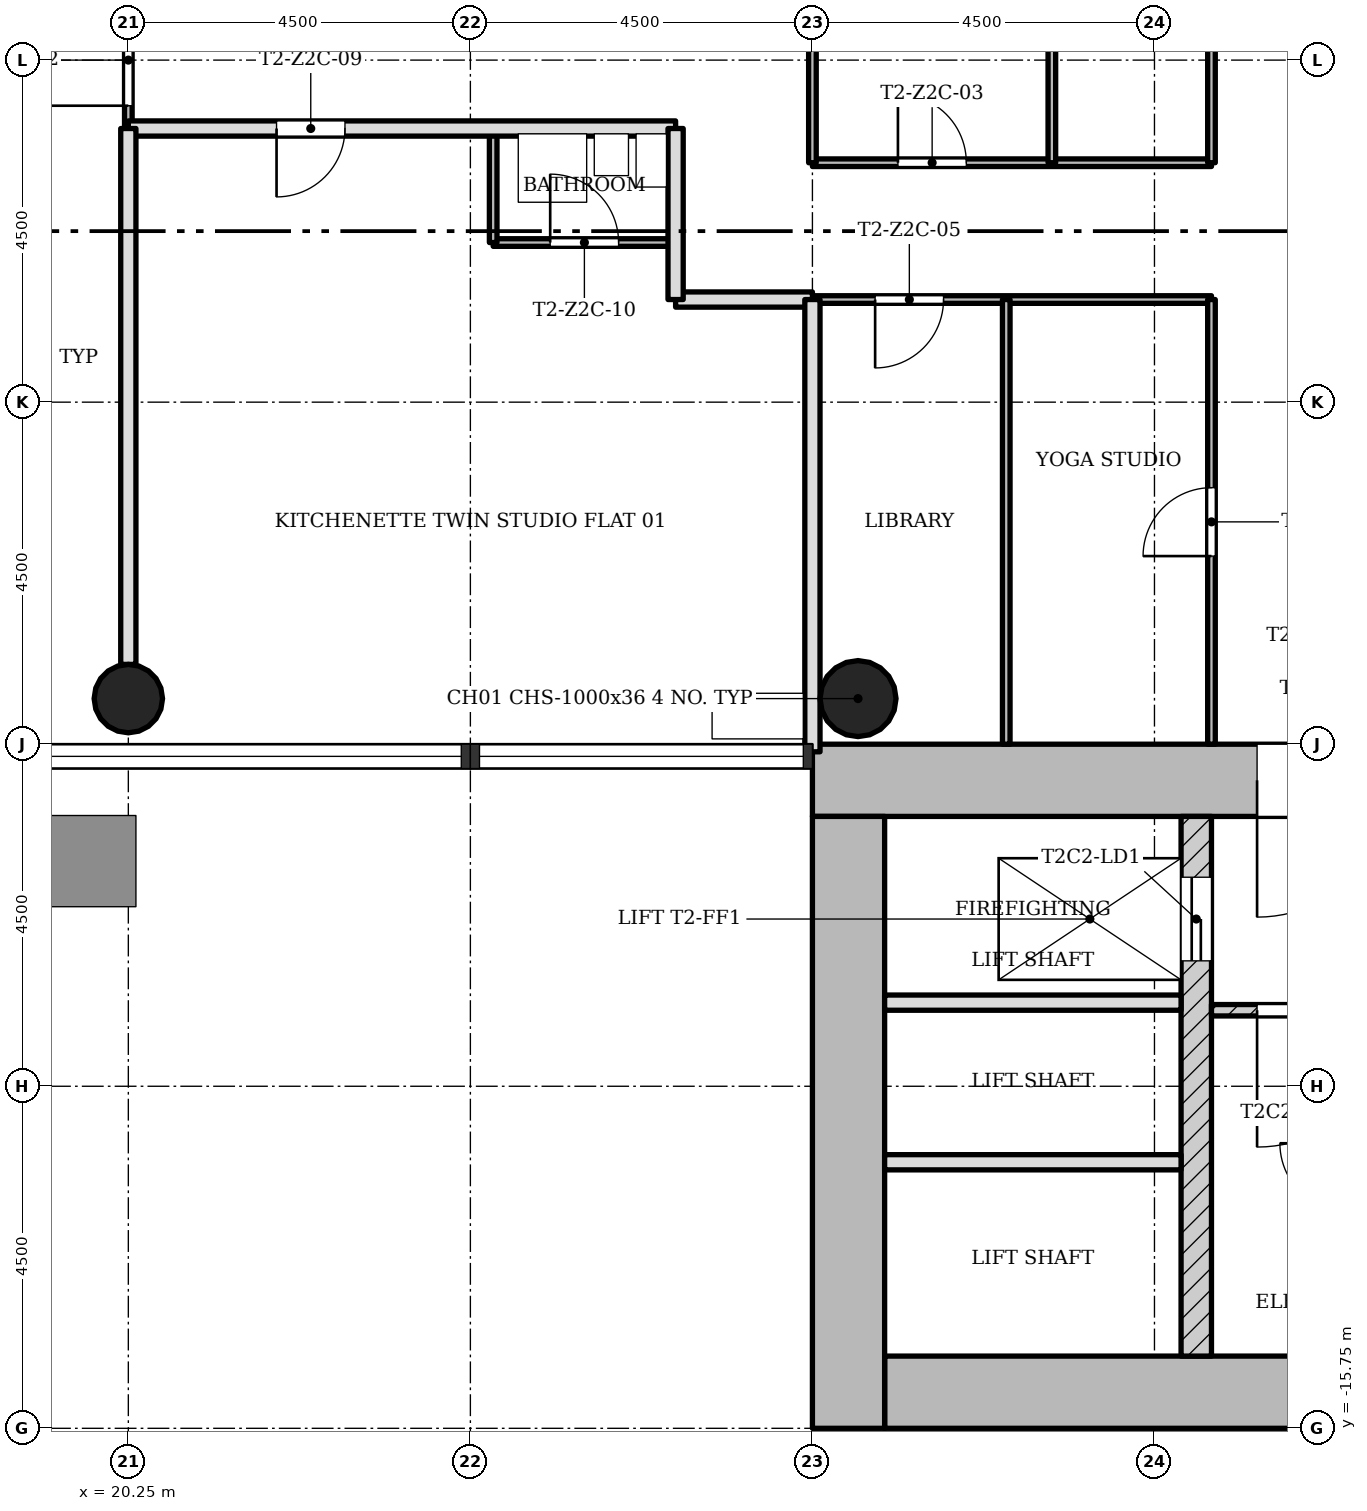
"""IFC4 building model, lengths in metres.
Left out: names, types, materials, properties, quantities, classifications, styles, units other than length and angle.
Written with IfcOpenShell. Run it as: python <this file> out.ifc"""

import sys

from ifc_helpers import new_model, si_unit, direction, frame, frame_2d, origin, origin_2d, place, context, subcontext, project, spatial, rectangle, hollow_circle, extrude, element, fill, save


model = new_model("IFC4")
c1 = context("Model", 3, precision=1e-05, world=origin(), true_north=direction((0.0, 1.0)))
c2 = subcontext(c1, "Body", "Model", "MODEL_VIEW")
j1 = project(units=[si_unit("LENGTHUNIT", "METRE"), si_unit("PLANEANGLEUNIT", "RADIAN")], contexts=[c1])
p1 = place(None, origin())
s1 = spatial("IfcSite", under=j1, at=p1, CompositionType="ELEMENT")
p2 = place(p1, origin())
s2 = spatial("IfcBuilding", under=s1, at=p2, CompositionType="ELEMENT")
p3 = place(p2, frame((0.0, 0.0, 86.8)))
s3 = spatial("IfcBuildingStorey", under=s2, at=p3, CompositionType="ELEMENT", Elevation=86.8)
p4 = place(p3, frame((30.2, -15.275, 0.0), z_axis=(0.0, 0.0, 1.0), x_axis=(1.0, 0.0, 0.0)))
e1 = element("IfcWall", 1, at=p4, inside=s3, PredefinedType="SHEAR", context=c2, shape_type="SweptSolid", body=[
    extrude(rectangle(XDim=12.55, YDim=0.95, at=frame_2d((6.275, 0.0))), origin(), (0.0, 0.0, 1.0), 3.4),
])
p5 = place(p4, frame((5.35, 0.0, 0.45)))
e2 = element("IfcOpeningElement", 2, at=p5, cuts=e1, PredefinedType="OPENING", context=c2, shape_type="SweptSolid", body=[
    extrude(rectangle(XDim=0.9, YDim=2.4, at=frame_2d((0.45, 1.2))), frame((0.0, 0.485, 0.0), z_axis=(0.0, -1.0, 0.0), x_axis=(1.0, 0.0, 0.0)), (0.0, 0.0, 1.0), 0.97),
])
p6 = place(p3, frame((41.8, -7.225, 0.0), z_axis=(0.0, 0.0, 1.0), x_axis=(-1.0, 0.0, 0.0)))
e3 = element("IfcWall", 3, at=p6, inside=s3, PredefinedType="SHEAR", context=c2, shape_type="SweptSolid", body=[
    extrude(rectangle(XDim=12.55, YDim=0.95, at=frame_2d((6.275, 0.0))), origin(), (0.0, 0.0, 1.0), 3.4),
])
p7 = place(p6, frame((4.9, 0.0, 0.0)))
e4 = element("IfcOpeningElement", 4, at=p7, cuts=e3, PredefinedType="OPENING", context=c2, shape_type="SweptSolid", body=[
    extrude(rectangle(XDim=1.8, YDim=2.1, at=frame_2d((0.9, 1.05))), frame((0.0, 0.485, 0.0), z_axis=(0.0, -1.0, 0.0), x_axis=(1.0, 0.0, 0.0)), (0.0, 0.0, 1.0), 0.97),
])
p8 = place(p3, frame((29.725, -7.7, 0.0), z_axis=(0.0, 0.0, 1.0), x_axis=(0.0, -1.0, 0.0)))
e5 = element("IfcWall", 5, at=p8, inside=s3, PredefinedType="SHEAR", context=c2, shape_type="SweptSolid", body=[
    extrude(rectangle(XDim=8.05, YDim=0.95, at=frame_2d((4.025, 0.0))), origin(), (0.0, 0.0, 1.0), 3.4),
])
p9 = place(p3, frame((34.3, -14.8, 0.0), z_axis=(0.0, 0.0, 1.0), x_axis=(0.0, 1.0, 0.0)))
e6 = element("IfcWall", 6, at=p9, inside=s3, PredefinedType="SHEAR", context=c2, shape_type="SweptSolid", body=[
    extrude(rectangle(XDim=7.1, YDim=0.4, at=frame_2d((3.55, 0.0))), origin(), (0.0, 0.0, 1.0), 3.4),
])
p10 = place(p9, frame((5.2, 0.0, 0.0)))
e7 = element("IfcOpeningElement", 7, at=p10, cuts=e6, PredefinedType="OPENING", context=c2, shape_type="SweptSolid", body=[
    extrude(rectangle(XDim=1.1, YDim=2.1, at=frame_2d((0.55, 1.05))), frame((0.0, 0.21, 0.0), z_axis=(0.0, -1.0, 0.0), x_axis=(1.0, 0.0, 0.0)), (0.0, 0.0, 1.0), 0.42),
])
p11 = place(p3, frame((20.25, -6.15, 0.0), z_axis=(0.0, 0.0, 1.0), x_axis=(1.0, 0.0, 0.0)))
e8 = element("IfcColumn", 8, at=p11, inside=s3, PredefinedType="COLUMN", context=c2, shape_type="SweptSolid", body=[
    extrude(hollow_circle(Radius=0.45, WallThickness=0.032, at=origin_2d()), origin(), (0.0, 0.0, 1.0), 3.4),
])
p12 = place(p3, frame((29.85, -6.15, 0.0), z_axis=(0.0, 0.0, 1.0), x_axis=(1.0, 0.0, 0.0)))
e9 = element("IfcColumn", 9, at=p12, inside=s3, PredefinedType="COLUMN", context=c2, shape_type="SweptSolid", body=[
    extrude(hollow_circle(Radius=0.5, WallThickness=0.036, at=origin_2d()), origin(), (0.0, 0.0, 1.0), 3.4),
])
p13 = place(p3, frame((34.5, -10.25, 0.0), z_axis=(0.0, 0.0, 1.0), x_axis=(1.0, 0.0, 0.0)))
e10 = element("IfcWall", 10, at=p13, inside=s3, PredefinedType="PARTITIONING", context=c2, shape_type="SweptSolid", body=[
    extrude(rectangle(XDim=3.0, YDim=0.15, at=frame_2d((1.5, 0.0))), origin(), (0.0, 0.0, 1.0), 3.0),
])
p14 = place(p13, frame((0.6, 0.0, 0.0)))
e11 = element("IfcOpeningElement", 11, at=p14, cuts=e10, PredefinedType="OPENING", context=c2, shape_type="SweptSolid", body=[
    extrude(rectangle(XDim=1.8, YDim=2.1, at=frame_2d((0.9, 1.05))), frame((0.0, 0.085, 0.0), z_axis=(0.0, -1.0, 0.0), x_axis=(1.0, 0.0, 0.0)), (0.0, 0.0, 1.0), 0.17),
])
for number, where, z_axis, x_axis in (
    (12, (30.2, -10.15, 0.0), (0.0, 0.0, 1.0), (1.0, 0.0, 0.0)),
    (13, (30.2, -12.25, 0.0), (0.0, 0.0, 1.0), (1.0, 0.0, 0.0)),
):
    element("IfcWall", number, at=place(p3, frame(where, z_axis=z_axis, x_axis=x_axis)), inside=s3, PredefinedType="SOLIDWALL", context=c2, shape_type="SweptSolid", body=[
        extrude(rectangle(XDim=3.9, YDim=0.2, at=frame_2d((1.95, 0.0))), origin(), (0.0, 0.0, 1.0), 3.0),
    ])
p15 = place(p3, frame((34.5, -0.9, 0.0), z_axis=(0.0, 0.0, 1.0), x_axis=(-1.0, 0.0, 0.0)))
e14 = element("IfcWall", 14, at=p15, inside=s3, PredefinedType="PARTITIONING", context=c2, shape_type="SweptSolid", body=[
    extrude(rectangle(XDim=5.25, YDim=0.1, at=frame_2d((2.625, 0.0))), origin(), (0.0, 0.0, 1.0), 3.0),
])
p16 = place(p15, frame((3.525, 0.0, 0.0)))
e15 = element("IfcOpeningElement", 15, at=p16, cuts=e14, PredefinedType="OPENING", context=c2, shape_type="SweptSolid", body=[
    extrude(rectangle(XDim=0.9, YDim=2.1, at=frame_2d((0.45, 1.05))), frame((0.0, 0.06, 0.0), z_axis=(0.0, -1.0, 0.0), x_axis=(1.0, 0.0, 0.0)), (0.0, 0.0, 1.0), 0.12),
])
p17 = place(p3, frame((29.25, -0.9, 0.0), z_axis=(0.0, 0.0, 1.0), x_axis=(-1.0, 0.0, 0.0)))
e16 = element("IfcWall", 16, at=p17, inside=s3, PredefinedType="SOLIDWALL", context=c2, shape_type="SweptSolid", body=[
    extrude(rectangle(XDim=1.8, YDim=0.2, at=frame_2d((0.9, 0.0))), origin(), (0.0, 0.0, 1.0), 3.0),
])
p18 = place(p3, frame((27.45, -0.15, 0.0), z_axis=(0.0, 0.0, 1.0), x_axis=(-1.0, 0.0, 0.0)))
e17 = element("IfcWall", 17, at=p18, inside=s3, PredefinedType="PARTITIONING", context=c2, shape_type="SweptSolid", body=[
    extrude(rectangle(XDim=2.4, YDim=0.1, at=frame_2d((1.2, 0.0))), origin(), (0.0, 0.0, 1.0), 3.0),
])
p19 = place(p18, frame((0.75, 0.0, 0.0)))
e18 = element("IfcOpeningElement", 18, at=p19, cuts=e17, PredefinedType="OPENING", context=c2, shape_type="SweptSolid", body=[
    extrude(rectangle(XDim=0.9, YDim=2.1, at=frame_2d((0.45, 1.05))), frame((0.0, 0.06, 0.0), z_axis=(0.0, -1.0, 0.0), x_axis=(1.0, 0.0, 0.0)), (0.0, 0.0, 1.0), 0.12),
])
p20 = place(p3, frame((34.5, 0.9, 0.0), z_axis=(0.0, 0.0, 1.0), x_axis=(-1.0, 0.0, 0.0)))
e19 = element("IfcWall", 19, at=p20, inside=s3, PredefinedType="PARTITIONING", context=c2, shape_type="SweptSolid", body=[
    extrude(rectangle(XDim=5.25, YDim=0.1, at=frame_2d((2.625, 0.0))), origin(), (0.0, 0.0, 1.0), 3.0),
])
p21 = place(p20, frame((3.225, 0.0, 0.0)))
e20 = element("IfcOpeningElement", 20, at=p21, cuts=e19, PredefinedType="OPENING", context=c2, shape_type="SweptSolid", body=[
    extrude(rectangle(XDim=0.9, YDim=2.1, at=frame_2d((0.45, 1.05))), frame((0.0, 0.06, 0.0), z_axis=(0.0, -1.0, 0.0), x_axis=(1.0, 0.0, 0.0)), (0.0, 0.0, 1.0), 0.12),
])
p22 = place(p3, frame((27.45, 1.35, 0.0), z_axis=(0.0, 0.0, 1.0), x_axis=(-1.0, 0.0, 0.0)))
e21 = element("IfcWall", 21, at=p22, inside=s3, PredefinedType="SOLIDWALL", context=c2, shape_type="SweptSolid", body=[
    extrude(rectangle(XDim=7.2, YDim=0.2, at=frame_2d((3.6, 0.0))), origin(), (0.0, 0.0, 1.0), 3.0),
])
p23 = place(p22, frame((4.35, 0.0, 0.0)))
e22 = element("IfcOpeningElement", 22, at=p23, cuts=e21, PredefinedType="OPENING", context=c2, shape_type="SweptSolid", body=[
    extrude(rectangle(XDim=0.9, YDim=2.1, at=frame_2d((0.45, 1.05))), frame((0.0, 0.11, 0.0), z_axis=(0.0, -1.0, 0.0), x_axis=(1.0, 0.0, 0.0)), (0.0, 0.0, 1.0), 0.22),
])
p24 = place(p3, frame((34.5, -6.75, 0.0), z_axis=(0.0, 0.0, 1.0), x_axis=(0.0, 1.0, 0.0)))
e23 = element("IfcWall", 23, at=p24, inside=s3, PredefinedType="PARTITIONING", context=c2, shape_type="SweptSolid", body=[
    extrude(rectangle(XDim=5.85, YDim=0.1, at=frame_2d((2.925, 0.0))), origin(), (0.0, 0.0, 1.0), 3.0),
])
p25 = place(p24, frame((2.475, 0.0, 0.0)))
e24 = element("IfcOpeningElement", 24, at=p25, cuts=e23, PredefinedType="OPENING", context=c2, shape_type="SweptSolid", body=[
    extrude(rectangle(XDim=0.9, YDim=2.1, at=frame_2d((0.45, 1.05))), frame((0.0, 0.06, 0.0), z_axis=(0.0, -1.0, 0.0), x_axis=(1.0, 0.0, 0.0)), (0.0, 0.0, 1.0), 0.12),
])
p26 = place(p3, frame((34.5, 0.9, 0.0), z_axis=(0.0, 0.0, 1.0), x_axis=(0.0, 1.0, 0.0)))
e25 = element("IfcWall", 25, at=p26, inside=s3, PredefinedType="PARTITIONING", context=c2, shape_type="SweptSolid", body=[
    extrude(rectangle(XDim=5.85, YDim=0.1, at=frame_2d((2.925, 0.0))), origin(), (0.0, 0.0, 1.0), 3.0),
])
p27 = place(p26, frame((2.475, 0.0, 0.0)))
e26 = element("IfcOpeningElement", 26, at=p27, cuts=e25, PredefinedType="OPENING", context=c2, shape_type="SweptSolid", body=[
    extrude(rectangle(XDim=0.9, YDim=2.1, at=frame_2d((0.45, 1.05))), frame((0.0, 0.06, 0.0), z_axis=(0.0, -1.0, 0.0), x_axis=(1.0, 0.0, 0.0)), (0.0, 0.0, 1.0), 0.12),
])
for number, where, z_axis, x_axis in (
    (27, (32.4, 0.9, 0.0), (0.0, 0.0, 1.0), (0.0, 1.0, 0.0)),
    (28, (31.8, -6.75, 0.0), (0.0, 0.0, 1.0), (0.0, 1.0, 0.0)),
):
    element("IfcWall", number, at=place(p3, frame(where, z_axis=z_axis, x_axis=x_axis)), inside=s3, PredefinedType="PARTITIONING", context=c2, shape_type="SweptSolid", body=[
        extrude(rectangle(XDim=5.85, YDim=0.1, at=frame_2d((2.925, 0.0))), origin(), (0.0, 0.0, 1.0), 3.0),
    ])
p28 = place(p3, frame((29.25, 0.9, 0.0), z_axis=(0.0, 0.0, 1.0), x_axis=(0.0, 1.0, 0.0)))
e29 = element("IfcWall", 29, at=p28, inside=s3, PredefinedType="PARTITIONING", context=c2, shape_type="SweptSolid", body=[
    extrude(rectangle(XDim=5.95, YDim=0.1, at=frame_2d((2.975, 0.0))), origin(), (0.0, 0.0, 1.0), 3.0),
])
p29 = place(p3, frame((29.25, -6.85, 0.0), z_axis=(0.0, 0.0, 1.0), x_axis=(0.0, 1.0, 0.0)))
e30 = element("IfcWall", 30, at=p29, inside=s3, PredefinedType="SOLIDWALL", context=c2, shape_type="SweptSolid", body=[
    extrude(rectangle(XDim=5.95, YDim=0.2, at=frame_2d((2.975, 0.0))), origin(), (0.0, 0.0, 1.0), 3.0),
])
p30 = place(p3, frame((27.45, -0.9, 0.0), z_axis=(0.0, 0.0, 1.0), x_axis=(0.0, 1.0, 0.0)))
e31 = element("IfcWall", 31, at=p30, inside=s3, PredefinedType="SOLIDWALL", context=c2, shape_type="SweptSolid", body=[
    extrude(rectangle(XDim=2.25, YDim=0.2, at=frame_2d((1.125, 0.0))), origin(), (0.0, 0.0, 1.0), 3.0),
])
p31 = place(p3, frame((25.05, -0.15, 0.0), z_axis=(0.0, 0.0, 1.0), x_axis=(0.0, 1.0, 0.0)))
e32 = element("IfcWall", 32, at=p31, inside=s3, PredefinedType="PARTITIONING", context=c2, shape_type="SweptSolid", body=[
    extrude(rectangle(XDim=1.5, YDim=0.1, at=frame_2d((0.75, 0.0))), origin(), (0.0, 0.0, 1.0), 3.0),
])
p32 = place(p3, frame((20.25, 1.35, 0.0), z_axis=(0.0, 0.0, 1.0), x_axis=(0.0, 1.0, 0.0)))
e33 = element("IfcWall", 33, at=p32, inside=s3, PredefinedType="PARTITIONING", context=c2, shape_type="SweptSolid", body=[
    extrude(rectangle(XDim=4.35, YDim=0.1, at=frame_2d((2.175, 0.0))), origin(), (0.0, 0.0, 1.0), 3.0),
])
p33 = place(p32, frame((0.3, 0.0, 0.0)))
e34 = element("IfcOpeningElement", 34, at=p33, cuts=e33, PredefinedType="OPENING", context=c2, shape_type="SweptSolid", body=[
    extrude(rectangle(XDim=1.2, YDim=2.1, at=frame_2d((0.6, 1.05))), frame((0.0, 0.06, 0.0), z_axis=(0.0, -1.0, 0.0), x_axis=(1.0, 0.0, 0.0)), (0.0, 0.0, 1.0), 0.12),
])
p34 = place(p3, frame((20.25, -5.7, 0.0), z_axis=(0.0, 0.0, 1.0), x_axis=(0.0, 1.0, 0.0)))
e35 = element("IfcWall", 35, at=p34, inside=s3, PredefinedType="SOLIDWALL", context=c2, shape_type="SweptSolid", body=[
    extrude(rectangle(XDim=7.05, YDim=0.2, at=frame_2d((3.525, 0.0))), origin(), (0.0, 0.0, 1.0), 3.0),
])
p35 = place(p14, origin())
e36 = element("IfcDoor", 36, at=p35, inside=s3, OperationType="SINGLE_SWING_LEFT", PredefinedType="DOOR", context=c2, shape_type="SweptSolid", body=[
    extrude(rectangle(XDim=1.8, YDim=2.1, at=frame_2d((0.9, 1.05))), frame((0.0, 0.025, 0.0), z_axis=(0.0, -1.0, 0.0), x_axis=(1.0, 0.0, 0.0)), (0.0, 0.0, 1.0), 0.05),
])
fill(e11, e36)
p36 = place(p21, origin())
e37 = element("IfcDoor", 37, at=p36, inside=s3, OperationType="SINGLE_SWING_RIGHT", PredefinedType="DOOR", context=c2, shape_type="SweptSolid", body=[
    extrude(rectangle(XDim=0.9, YDim=2.1, at=frame_2d((0.45, 1.05))), frame((0.0, 0.025, 0.0), z_axis=(0.0, -1.0, 0.0), x_axis=(1.0, 0.0, 0.0)), (0.0, 0.0, 1.0), 0.05),
])
fill(e20, e37)
p37 = place(p25, origin())
e38 = element("IfcDoor", 38, at=p37, inside=s3, OperationType="SINGLE_SWING_RIGHT", PredefinedType="DOOR", context=c2, shape_type="SweptSolid", body=[
    extrude(rectangle(XDim=0.9, YDim=2.1, at=frame_2d((0.45, 1.05))), frame((0.0, 0.025, 0.0), z_axis=(0.0, -1.0, 0.0), x_axis=(1.0, 0.0, 0.0)), (0.0, 0.0, 1.0), 0.05),
])
fill(e24, e38)
p38 = place(p16, origin())
e39 = element("IfcDoor", 39, at=p38, inside=s3, OperationType="SINGLE_SWING_LEFT", PredefinedType="DOOR", context=c2, shape_type="SweptSolid", body=[
    extrude(rectangle(XDim=0.9, YDim=2.1, at=frame_2d((0.45, 1.05))), frame((0.0, 0.025, 0.0), z_axis=(0.0, -1.0, 0.0), x_axis=(1.0, 0.0, 0.0)), (0.0, 0.0, 1.0), 0.05),
])
fill(e15, e39)
p39 = place(p23, origin())
e40 = element("IfcDoor", 40, at=p39, inside=s3, OperationType="SINGLE_SWING_LEFT", PredefinedType="DOOR", context=c2, shape_type="SweptSolid", body=[
    extrude(rectangle(XDim=0.9, YDim=2.1, at=frame_2d((0.45, 1.05))), frame((0.0, 0.025, 0.0), z_axis=(0.0, -1.0, 0.0), x_axis=(1.0, 0.0, 0.0)), (0.0, 0.0, 1.0), 0.05),
])
fill(e22, e40)
p40 = place(p19, origin())
e41 = element("IfcDoor", 41, at=p40, inside=s3, OperationType="SINGLE_SWING_RIGHT", PredefinedType="DOOR", context=c2, shape_type="SweptSolid", body=[
    extrude(rectangle(XDim=0.9, YDim=2.1, at=frame_2d((0.45, 1.05))), frame((0.0, 0.025, 0.0), z_axis=(0.0, -1.0, 0.0), x_axis=(1.0, 0.0, 0.0)), (0.0, 0.0, 1.0), 0.05),
])
fill(e18, e41)
p41 = place(p33, origin())
e42 = element("IfcDoor", 42, at=p41, inside=s3, OperationType="SINGLE_SWING_RIGHT", PredefinedType="DOOR", context=c2, shape_type="SweptSolid", body=[
    extrude(rectangle(XDim=1.2, YDim=2.1, at=frame_2d((0.6, 1.05))), frame((0.0, 0.025, 0.0), z_axis=(0.0, -1.0, 0.0), x_axis=(1.0, 0.0, 0.0)), (0.0, 0.0, 1.0), 0.05),
])
fill(e34, e42)
p42 = place(p10, origin())
e43 = element("IfcDoor", 43, at=p42, inside=s3, OperationType="SLIDING_TO_LEFT", PredefinedType="DOOR", context=c2, shape_type="SweptSolid", body=[
    extrude(rectangle(XDim=1.1, YDim=2.1, at=frame_2d((0.55, 1.05))), frame((0.0, 0.025, 0.0), z_axis=(0.0, -1.0, 0.0), x_axis=(1.0, 0.0, 0.0)), (0.0, 0.0, 1.0), 0.05),
])
fill(e7, e43)
p43 = place(p7, origin())
e44 = element("IfcDoor", 44, at=p43, inside=s3, OperationType="SINGLE_SWING_LEFT", PredefinedType="DOOR", context=c2, shape_type="SweptSolid", body=[
    extrude(rectangle(XDim=1.8, YDim=2.1, at=frame_2d((0.9, 1.05))), frame((0.0, 0.025, 0.0), z_axis=(0.0, -1.0, 0.0), x_axis=(1.0, 0.0, 0.0)), (0.0, 0.0, 1.0), 0.05),
])
fill(e4, e44)
save(model, sys.argv[1])
